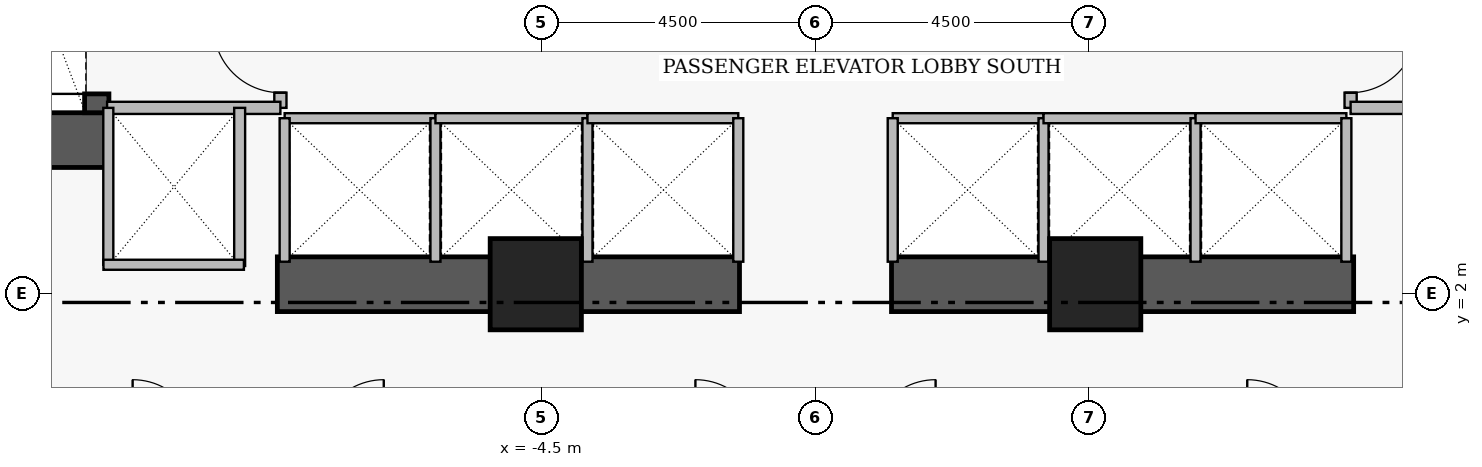
"""IFC4 building model, lengths in metres.
Left out: names, types, materials, properties, quantities, classifications, styles, units other than length and angle.
Written with IfcOpenShell. Run it as: python <this file> out.ifc"""

import sys

from ifc_helpers import new_model, si_unit, direction, frame, frame_2d, origin, origin_2d, place, context, subcontext, project, spatial, rectangle, extrude, element, fill, save


model = new_model("IFC4")
c1 = context("Model", 3, precision=1e-05, world=origin(), true_north=direction((0.0, 1.0)))
c2 = subcontext(c1, "Body", "Model", "MODEL_VIEW")
j1 = project(units=[si_unit("LENGTHUNIT", "METRE"), si_unit("PLANEANGLEUNIT", "RADIAN")], contexts=[c1])
p1 = place(None, origin())
s1 = spatial("IfcSite", under=j1, at=p1, CompositionType="ELEMENT")
p2 = place(p1, origin())
s2 = spatial("IfcBuilding", under=s1, at=p2, CompositionType="ELEMENT")
p3 = place(p2, frame((0.0, 0.0, 89.65)))
s3 = spatial("IfcBuildingStorey", under=s2, at=p3, CompositionType="ELEMENT", Elevation=89.65)
p4 = place(p3, frame((-16.31, 4.52, 0.0), z_axis=(0.0, 0.0, 1.0), x_axis=(1.0, 0.0, 0.0)))
e1 = element("IfcWall", 1, at=p4, inside=s3, PredefinedType="SHEAR", context=c2, shape_type="SweptSolid", body=[
    extrude(rectangle(XDim=4.71, YDim=0.9, at=frame_2d((2.355, 0.0))), origin(), (0.0, 0.0, 1.0), 5.81),
])
for number, where, z_axis, x_axis in (
    (2, (-8.85, 2.15, 0.0), (0.0, 0.0, 1.0), (1.0, 0.0, 0.0)),
    (3, (1.25, 2.15, 0.0), (0.0, 0.0, 1.0), (1.0, 0.0, 0.0)),
):
    element("IfcWall", number, at=place(p3, frame(where, z_axis=z_axis, x_axis=x_axis)), inside=s3, PredefinedType="SHEAR", context=c2, shape_type="SweptSolid", body=[
        extrude(rectangle(XDim=7.6, YDim=0.9, at=frame_2d((3.8, 0.0))), origin(), (0.0, 0.0, 1.0), 5.74),
    ])
p5 = place(p3, frame((-11.82, 4.97, 0.0), z_axis=(0.0, 0.0, 1.0), x_axis=(0.0, 1.0, 0.0)))
e4 = element("IfcWall", 4, at=p5, inside=s3, PredefinedType="SHEAR", context=c2, shape_type="SweptSolid", body=[
    extrude(rectangle(XDim=8.96, YDim=0.4, at=frame_2d((4.48, 0.0))), origin(), (0.0, 0.0, 1.0), 5.81),
])
p6 = place(p5, frame((0.31, 0.0, 0.0)))
e5 = element("IfcOpeningElement", 5, at=p6, cuts=e4, PredefinedType="OPENING", context=c2, shape_type="SweptSolid", body=[
    extrude(rectangle(XDim=1.12, YDim=2.22, at=frame_2d((0.56, 1.11))), frame((0.0, 0.21, 0.0), z_axis=(0.0, -1.0, 0.0), x_axis=(1.0, 0.0, 0.0)), (0.0, 0.0, 1.0), 0.42),
])
for number, where, z_axis, x_axis in (
    (6, (-4.6, 2.15, 0.0), (0.0, 0.0, 1.0), (1.0, 0.0, 0.0)),
    (7, (4.6, 2.15, 0.0), (0.0, 0.0, 1.0), (1.0, 0.0, 0.0)),
):
    element("IfcColumn", number, at=place(p3, frame(where, z_axis=z_axis, x_axis=x_axis)), inside=s3, PredefinedType="COLUMN", context=c2, shape_type="SweptSolid", body=[
        extrude(rectangle(XDim=1.5, YDim=1.5, at=origin_2d()), origin(), (0.0, 0.0, 1.0), 6.0),
    ])
p7 = place(p3, frame((-8.8, 5.05, 0.0), z_axis=(0.0, 0.0, 1.0), x_axis=(0.0, 1.0, 0.0)))
e8 = element("IfcWall", 8, at=p7, inside=s3, PredefinedType="PARTITIONING", context=c2, shape_type="SweptSolid", body=[
    extrude(rectangle(XDim=6.1, YDim=0.2, at=frame_2d((3.05, 0.0))), origin(), (0.0, 0.0, 1.0), 5.74),
])
p8 = place(p7, frame((0.25, 0.0, 0.0)))
e9 = element("IfcOpeningElement", 9, at=p8, cuts=e8, PredefinedType="OPENING", context=c2, shape_type="SweptSolid", body=[
    extrude(rectangle(XDim=1.1, YDim=2.2, at=frame_2d((0.55, 1.1))), frame((0.0, 0.11, 0.0), z_axis=(0.0, -1.0, 0.0), x_axis=(1.0, 0.0, 0.0)), (0.0, 0.0, 1.0), 0.22),
])
p9 = place(p7, frame((3.85, 0.0, 0.0)))
e10 = element("IfcOpeningElement", 10, at=p9, cuts=e8, PredefinedType="OPENING", context=c2, shape_type="SweptSolid", body=[
    extrude(rectangle(XDim=1.1, YDim=2.2, at=frame_2d((0.55, 1.1))), frame((0.0, 0.11, 0.0), z_axis=(0.0, -1.0, 0.0), x_axis=(1.0, 0.0, 0.0)), (0.0, 0.0, 1.0), 0.22),
])
p10 = place(p3, frame((8.8, 11.15, 0.0), z_axis=(0.0, 0.0, 1.0), x_axis=(0.0, -1.0, 0.0)))
e11 = element("IfcWall", 11, at=p10, inside=s3, PredefinedType="PARTITIONING", context=c2, shape_type="SweptSolid", body=[
    extrude(rectangle(XDim=6.1, YDim=0.2, at=frame_2d((3.05, 0.0))), origin(), (0.0, 0.0, 1.0), 5.74),
])
p11 = place(p10, frame((1.15, 0.0, 0.0)))
e12 = element("IfcOpeningElement", 12, at=p11, cuts=e11, PredefinedType="OPENING", context=c2, shape_type="SweptSolid", body=[
    extrude(rectangle(XDim=1.1, YDim=2.2, at=frame_2d((0.55, 1.1))), frame((0.0, 0.11, 0.0), z_axis=(0.0, -1.0, 0.0), x_axis=(1.0, 0.0, 0.0)), (0.0, 0.0, 1.0), 0.22),
])
p12 = place(p10, frame((4.75, 0.0, 0.0)))
e13 = element("IfcOpeningElement", 13, at=p12, cuts=e11, PredefinedType="OPENING", context=c2, shape_type="SweptSolid", body=[
    extrude(rectangle(XDim=1.1, YDim=2.2, at=frame_2d((0.55, 1.1))), frame((0.0, 0.11, 0.0), z_axis=(0.0, -1.0, 0.0), x_axis=(1.0, 0.0, 0.0)), (0.0, 0.0, 1.0), 0.22),
])
for number, where, z_axis, x_axis in (
    (14, (-11.65, 5.05, 0.0), (0.0, 0.0, 1.0), (1.0, 0.0, 0.0)),
    (15, (8.8, 5.05, 0.0), (0.0, 0.0, 1.0), (1.0, 0.0, 0.0)),
):
    element("IfcWall", number, at=place(p3, frame(where, z_axis=z_axis, x_axis=x_axis)), inside=s3, PredefinedType="PARTITIONING", context=c2, shape_type="SweptSolid", body=[
        extrude(rectangle(XDim=2.85, YDim=0.2, at=frame_2d((1.425, 0.0))), origin(), (0.0, 0.0, 1.0), 5.74),
    ])
p13 = place(p3, frame((-8.73, 4.88, 0.0), z_axis=(0.0, 0.0, 1.0), x_axis=(1.0, 0.0, 0.0)))
e16 = element("IfcWall", 16, at=p13, inside=s3, PredefinedType="PARTITIONING", context=c2, shape_type="SweptSolid", body=[
    extrude(rectangle(XDim=2.48, YDim=0.165, at=frame_2d((1.24, 0.0))), origin(), (0.0, 0.0, 1.0), 5.74),
])
for number, where, z_axis, x_axis in (
    (17, (-8.73, 2.52, 0.0), (0.0, 0.0, 1.0), (0.0, 1.0, 0.0)),
    (18, (-6.25, 2.52, 0.0), (0.0, 0.0, 1.0), (0.0, 1.0, 0.0)),
):
    element("IfcWall", number, at=place(p3, frame(where, z_axis=z_axis, x_axis=x_axis)), inside=s3, PredefinedType="PARTITIONING", context=c2, shape_type="SweptSolid", body=[
        extrude(rectangle(XDim=2.36, YDim=0.165, at=frame_2d((1.18, 0.0))), origin(), (0.0, 0.0, 1.0), 5.74),
    ])
p14 = place(p3, frame((-6.25, 4.88, 0.0), z_axis=(0.0, 0.0, 1.0), x_axis=(1.0, 0.0, 0.0)))
e19 = element("IfcWall", 19, at=p14, inside=s3, PredefinedType="PARTITIONING", context=c2, shape_type="SweptSolid", body=[
    extrude(rectangle(XDim=2.5, YDim=0.165, at=frame_2d((1.25, 0.0))), origin(), (0.0, 0.0, 1.0), 5.74),
])
p15 = place(p3, frame((-3.75, 2.52, 0.0), z_axis=(0.0, 0.0, 1.0), x_axis=(0.0, 1.0, 0.0)))
e20 = element("IfcWall", 20, at=p15, inside=s3, PredefinedType="PARTITIONING", context=c2, shape_type="SweptSolid", body=[
    extrude(rectangle(XDim=2.36, YDim=0.165, at=frame_2d((1.18, 0.0))), origin(), (0.0, 0.0, 1.0), 5.74),
])
p16 = place(p3, frame((-3.75, 4.88, 0.0), z_axis=(0.0, 0.0, 1.0), x_axis=(1.0, 0.0, 0.0)))
e21 = element("IfcWall", 21, at=p16, inside=s3, PredefinedType="PARTITIONING", context=c2, shape_type="SweptSolid", body=[
    extrude(rectangle(XDim=2.48, YDim=0.165, at=frame_2d((1.24, 0.0))), origin(), (0.0, 0.0, 1.0), 5.74),
])
p17 = place(p3, frame((-1.27, 2.52, 0.0), z_axis=(0.0, 0.0, 1.0), x_axis=(0.0, 1.0, 0.0)))
e22 = element("IfcWall", 22, at=p17, inside=s3, PredefinedType="PARTITIONING", context=c2, shape_type="SweptSolid", body=[
    extrude(rectangle(XDim=2.36, YDim=0.165, at=frame_2d((1.18, 0.0))), origin(), (0.0, 0.0, 1.0), 5.74),
])
p18 = place(p3, frame((1.27, 4.88, 0.0), z_axis=(0.0, 0.0, 1.0), x_axis=(1.0, 0.0, 0.0)))
e23 = element("IfcWall", 23, at=p18, inside=s3, PredefinedType="PARTITIONING", context=c2, shape_type="SweptSolid", body=[
    extrude(rectangle(XDim=2.48, YDim=0.165, at=frame_2d((1.24, 0.0))), origin(), (0.0, 0.0, 1.0), 5.74),
])
for number, where, z_axis, x_axis in (
    (24, (1.27, 2.52, 0.0), (0.0, 0.0, 1.0), (0.0, 1.0, 0.0)),
    (25, (3.75, 2.52, 0.0), (0.0, 0.0, 1.0), (0.0, 1.0, 0.0)),
):
    element("IfcWall", number, at=place(p3, frame(where, z_axis=z_axis, x_axis=x_axis)), inside=s3, PredefinedType="PARTITIONING", context=c2, shape_type="SweptSolid", body=[
        extrude(rectangle(XDim=2.36, YDim=0.165, at=frame_2d((1.18, 0.0))), origin(), (0.0, 0.0, 1.0), 5.74),
    ])
p19 = place(p3, frame((3.75, 4.88, 0.0), z_axis=(0.0, 0.0, 1.0), x_axis=(1.0, 0.0, 0.0)))
e26 = element("IfcWall", 26, at=p19, inside=s3, PredefinedType="PARTITIONING", context=c2, shape_type="SweptSolid", body=[
    extrude(rectangle(XDim=2.5, YDim=0.165, at=frame_2d((1.25, 0.0))), origin(), (0.0, 0.0, 1.0), 5.74),
])
p20 = place(p3, frame((6.25, 2.52, 0.0), z_axis=(0.0, 0.0, 1.0), x_axis=(0.0, 1.0, 0.0)))
e27 = element("IfcWall", 27, at=p20, inside=s3, PredefinedType="PARTITIONING", context=c2, shape_type="SweptSolid", body=[
    extrude(rectangle(XDim=2.36, YDim=0.165, at=frame_2d((1.18, 0.0))), origin(), (0.0, 0.0, 1.0), 5.74),
])
p21 = place(p3, frame((6.25, 4.88, 0.0), z_axis=(0.0, 0.0, 1.0), x_axis=(1.0, 0.0, 0.0)))
e28 = element("IfcWall", 28, at=p21, inside=s3, PredefinedType="PARTITIONING", context=c2, shape_type="SweptSolid", body=[
    extrude(rectangle(XDim=2.48, YDim=0.165, at=frame_2d((1.24, 0.0))), origin(), (0.0, 0.0, 1.0), 5.74),
])
p22 = place(p3, frame((8.73, 2.52, 0.0), z_axis=(0.0, 0.0, 1.0), x_axis=(0.0, 1.0, 0.0)))
e29 = element("IfcWall", 29, at=p22, inside=s3, PredefinedType="PARTITIONING", context=c2, shape_type="SweptSolid", body=[
    extrude(rectangle(XDim=2.36, YDim=0.165, at=frame_2d((1.18, 0.0))), origin(), (0.0, 0.0, 1.0), 5.74),
])
p23 = place(p3, frame((-9.47, 2.45, 0.0), z_axis=(0.0, 0.0, 1.0), x_axis=(0.0, 1.0, 0.0)))
e30 = element("IfcWall", 30, at=p23, inside=s3, PredefinedType="PARTITIONING", context=c2, shape_type="SweptSolid", body=[
    extrude(rectangle(XDim=2.6, YDim=0.18, at=frame_2d((1.3, 0.0))), origin(), (0.0, 0.0, 1.0), 5.74),
])
p24 = place(p3, frame((-11.63, 2.47, 0.0), z_axis=(0.0, 0.0, 1.0), x_axis=(0.0, 1.0, 0.0)))
e31 = element("IfcWall", 31, at=p24, inside=s3, PredefinedType="PARTITIONING", context=c2, shape_type="SweptSolid", body=[
    extrude(rectangle(XDim=2.58, YDim=0.165, at=frame_2d((1.29, 0.0))), origin(), (0.0, 0.0, 1.0), 5.74),
])
p25 = place(p3, frame((-11.71, 2.47, 0.0), z_axis=(0.0, 0.0, 1.0), x_axis=(1.0, 0.0, 0.0)))
e32 = element("IfcWall", 32, at=p25, inside=s3, PredefinedType="PARTITIONING", context=c2, shape_type="SweptSolid", body=[
    extrude(rectangle(XDim=2.31, YDim=0.165, at=frame_2d((1.155, 0.0))), origin(), (0.0, 0.0, 1.0), 4.34),
])
p26 = place(p6, origin())
e33 = element("IfcDoor", 33, at=p26, inside=s3, OperationType="SINGLE_SWING_LEFT", PredefinedType="DOOR", context=c2, shape_type="SweptSolid", body=[
    extrude(rectangle(XDim=1.12, YDim=2.22, at=frame_2d((0.56, 1.11))), frame((0.0, 0.025, 0.0), z_axis=(0.0, -1.0, 0.0), x_axis=(1.0, 0.0, 0.0)), (0.0, 0.0, 1.0), 0.05),
])
fill(e5, e33)
p27 = place(p8, origin())
e34 = element("IfcDoor", 34, at=p27, inside=s3, OperationType="SINGLE_SWING_RIGHT", PredefinedType="DOOR", context=c2, shape_type="SweptSolid", body=[
    extrude(rectangle(XDim=1.1, YDim=2.2, at=frame_2d((0.55, 1.1))), frame((0.0, 0.025, 0.0), z_axis=(0.0, -1.0, 0.0), x_axis=(1.0, 0.0, 0.0)), (0.0, 0.0, 1.0), 0.05),
])
fill(e9, e34)
p28 = place(p12, origin())
e35 = element("IfcDoor", 35, at=p28, inside=s3, OperationType="SINGLE_SWING_LEFT", PredefinedType="DOOR", context=c2, shape_type="SweptSolid", body=[
    extrude(rectangle(XDim=1.1, YDim=2.2, at=frame_2d((0.55, 1.1))), frame((0.0, 0.025, 0.0), z_axis=(0.0, -1.0, 0.0), x_axis=(1.0, 0.0, 0.0)), (0.0, 0.0, 1.0), 0.05),
])
fill(e13, e35)
save(model, sys.argv[1])
